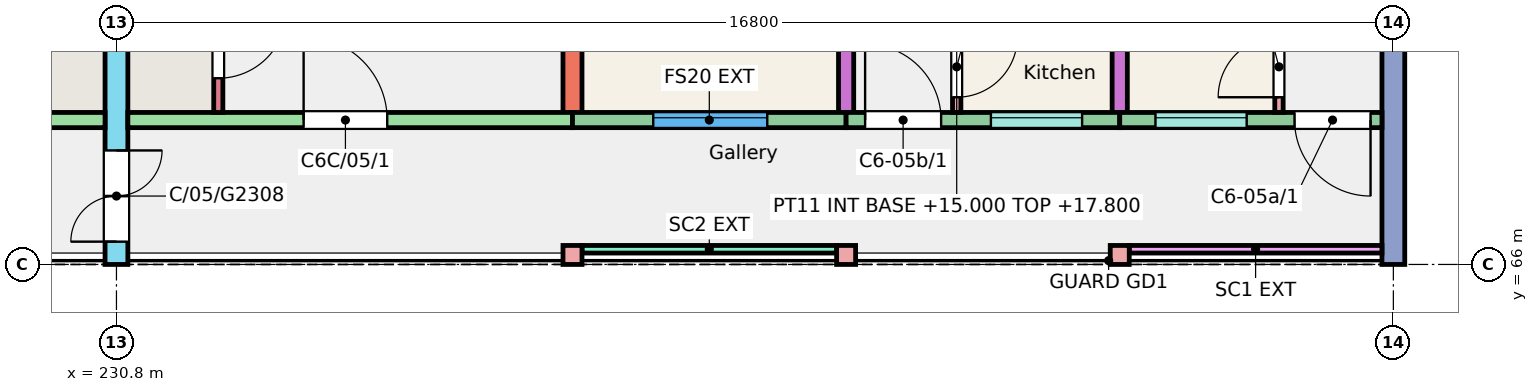
"""IFC4 building model, lengths in metres.
Left out: names, types, materials, properties, quantities, classifications, styles, units other than length and angle.
Written with IfcOpenShell. Run it as: python <this file> out.ifc"""

import sys

from ifc_helpers import new_model, si_unit, direction, frame, frame_2d, origin, origin_2d, place, context, subcontext, project, spatial, rectangle, extrude, element, fill, save


model = new_model("IFC4")
c1 = context("Model", 3, precision=1e-05, world=origin(), true_north=direction((0.0, 1.0)))
c2 = subcontext(c1, "Body", "Model", "MODEL_VIEW")
j1 = project(units=[si_unit("LENGTHUNIT", "METRE"), si_unit("PLANEANGLEUNIT", "RADIAN")], contexts=[c1])
p1 = place(None, origin())
s1 = spatial("IfcSite", under=j1, at=p1, CompositionType="ELEMENT")
p2 = place(p1, origin())
s2 = spatial("IfcBuilding", under=s1, at=p2, CompositionType="ELEMENT")
p3 = place(p2, frame((0.0, 0.0, 15.0)))
s3 = spatial("IfcBuildingStorey", under=s2, at=p3, CompositionType="ELEMENT", Elevation=15.0)
p4 = place(p3, frame((230.8, 66.0, 0.0), z_axis=(0.0, 0.0, 1.0), x_axis=(0.0, 1.0, 0.0)))
e1 = element("IfcWall", 1, at=p4, inside=s3, PredefinedType="SHEAR", context=c2, shape_type="SweptSolid", body=[
    extrude(rectangle(XDim=11.0, YDim=0.3, at=frame_2d((5.5, 0.0))), origin(), (0.0, 0.0, 1.0), 3.0),
])
p5 = place(p4, frame((0.3, 0.0, 0.0)))
e2 = element("IfcOpeningElement", 2, at=p5, cuts=e1, PredefinedType="OPENING", context=c2, shape_type="SweptSolid", body=[
    extrude(rectangle(XDim=1.2, YDim=2.1, at=frame_2d((0.6, 1.05))), frame((0.0, 0.16, 0.0), z_axis=(0.0, -1.0, 0.0), x_axis=(1.0, 0.0, 0.0)), (0.0, 0.0, 1.0), 0.32),
])
p6 = place(p3, frame((236.8, 68.0, 0.0), z_axis=(0.0, 0.0, 1.0), x_axis=(0.0, 1.0, 0.0)))
e3 = element("IfcWall", 3, at=p6, inside=s3, PredefinedType="SHEAR", context=c2, shape_type="SweptSolid", body=[
    extrude(rectangle(XDim=9.0, YDim=0.25, at=frame_2d((4.5, 0.0))), origin(), (0.0, 0.0, 1.0), 3.0),
])
p7 = place(p3, frame((240.4, 68.0, 0.0), z_axis=(0.0, 0.0, 1.0), x_axis=(0.0, 1.0, 0.0)))
e4 = element("IfcWall", 4, at=p7, inside=s3, PredefinedType="SHEAR", context=c2, shape_type="SweptSolid", body=[
    extrude(rectangle(XDim=9.0, YDim=0.2, at=frame_2d((4.5, 0.0))), origin(), (0.0, 0.0, 1.0), 3.0),
])
p8 = place(p7, frame((2.4, 0.0, 0.0)))
e5 = element("IfcOpeningElement", 5, at=p8, cuts=e4, PredefinedType="OPENING", context=c2, shape_type="SweptSolid", body=[
    extrude(rectangle(XDim=1.2, YDim=2.1, at=frame_2d((0.6, 1.05))), frame((0.0, 0.11, 0.0), z_axis=(0.0, -1.0, 0.0), x_axis=(1.0, 0.0, 0.0)), (0.0, 0.0, 1.0), 0.22),
])
p9 = place(p7, frame((6.4, 0.0, 0.0)))
e6 = element("IfcOpeningElement", 6, at=p9, cuts=e4, PredefinedType="OPENING", context=c2, shape_type="SweptSolid", body=[
    extrude(rectangle(XDim=1.2, YDim=2.1, at=frame_2d((0.6, 1.05))), frame((0.0, 0.11, 0.0), z_axis=(0.0, -1.0, 0.0), x_axis=(1.0, 0.0, 0.0)), (0.0, 0.0, 1.0), 0.22),
])
p10 = place(p3, frame((244.0, 68.0, 0.0), z_axis=(0.0, 0.0, 1.0), x_axis=(0.0, 1.0, 0.0)))
e7 = element("IfcWall", 7, at=p10, inside=s3, PredefinedType="SHEAR", context=c2, shape_type="SweptSolid", body=[
    extrude(rectangle(XDim=9.0, YDim=0.2, at=frame_2d((4.5, 0.0))), origin(), (0.0, 0.0, 1.0), 3.0),
])
p11 = place(p3, frame((247.6, 66.0, 0.0), z_axis=(0.0, 0.0, 1.0), x_axis=(0.0, 1.0, 0.0)))
e8 = element("IfcWall", 8, at=p11, inside=s3, PredefinedType="SHEAR", context=c2, shape_type="SweptSolid", body=[
    extrude(rectangle(XDim=11.0, YDim=0.3, at=frame_2d((5.5, 0.0))), origin(), (0.0, 0.0, 1.0), 3.0),
])
p12 = place(p11, frame((8.005, 0.0, 0.9)))
e9 = element("IfcOpeningElement", 9, at=p12, cuts=e8, PredefinedType="OPENING", context=c2, shape_type="SweptSolid", body=[
    extrude(rectangle(XDim=1.8, YDim=1.5, at=frame_2d((0.9, 0.75))), frame((0.0, 0.16, 0.0), z_axis=(0.0, -1.0, 0.0), x_axis=(1.0, 0.0, 0.0)), (0.0, 0.0, 1.0), 0.32),
])
p13 = place(p3, frame((224.8, 67.9, 0.0), z_axis=(0.0, 0.0, 1.0), x_axis=(1.0, 0.0, 0.0)))
e10 = element("IfcWall", 10, at=p13, inside=s3, PredefinedType="SHEAR", context=c2, shape_type="SweptSolid", body=[
    extrude(rectangle(XDim=5.85, YDim=0.2, at=frame_2d((2.925, 0.0))), origin(), (0.0, 0.0, 1.0), 3.0),
])
p14 = place(p13, frame((2.438, 0.0, 0.0)))
e11 = element("IfcOpeningElement", 11, at=p14, cuts=e10, PredefinedType="OPENING", context=c2, shape_type="SweptSolid", body=[
    extrude(rectangle(XDim=1.1, YDim=2.1, at=frame_2d((0.55, 1.05))), frame((0.0, 0.11, 0.0), z_axis=(0.0, -1.0, 0.0), x_axis=(1.0, 0.0, 0.0)), (0.0, 0.0, 1.0), 0.22),
])
p15 = place(p3, frame((230.95, 67.9, 0.0), z_axis=(0.0, 0.0, 1.0), x_axis=(1.0, 0.0, 0.0)))
e12 = element("IfcWall", 12, at=p15, inside=s3, PredefinedType="SHEAR", context=c2, shape_type="SweptSolid", body=[
    extrude(rectangle(XDim=5.85, YDim=0.2, at=frame_2d((2.925, 0.0))), origin(), (0.0, 0.0, 1.0), 3.0),
])
p16 = place(p15, frame((2.312, 0.0, 0.0)))
e13 = element("IfcOpeningElement", 13, at=p16, cuts=e12, PredefinedType="OPENING", context=c2, shape_type="SweptSolid", body=[
    extrude(rectangle(XDim=1.1, YDim=2.1, at=frame_2d((0.55, 1.05))), frame((0.0, 0.11, 0.0), z_axis=(0.0, -1.0, 0.0), x_axis=(1.0, 0.0, 0.0)), (0.0, 0.0, 1.0), 0.22),
])
p17 = place(p3, frame((232.14, 68.0, 0.0), z_axis=(0.0, 0.0, 1.0), x_axis=(0.0, 1.0, 0.0)))
e14 = element("IfcWall", 14, at=p17, inside=s3, PredefinedType="SHEAR", context=c2, shape_type="SweptSolid", body=[
    extrude(rectangle(XDim=1.72, YDim=0.12, at=frame_2d((0.86, 0.0))), origin(), (0.0, 0.0, 1.0), 3.0),
])
p18 = place(p17, frame((0.45, 0.0, 0.0)))
e15 = element("IfcOpeningElement", 15, at=p18, cuts=e14, PredefinedType="OPENING", context=c2, shape_type="SweptSolid", body=[
    extrude(rectangle(XDim=0.9, YDim=2.1, at=frame_2d((0.45, 1.05))), frame((0.0, 0.07, 0.0), z_axis=(0.0, -1.0, 0.0), x_axis=(1.0, 0.0, 0.0)), (0.0, 0.0, 1.0), 0.14),
])
p19 = place(p3, frame((236.8, 67.9, 0.0), z_axis=(0.0, 0.0, 1.0), x_axis=(1.0, 0.0, 0.0)))
e16 = element("IfcWall", 16, at=p19, inside=s3, PredefinedType="SOLIDWALL", context=c2, shape_type="SweptSolid", body=[
    extrude(rectangle(XDim=3.6, YDim=0.2, at=frame_2d((1.8, 0.0))), origin(), (0.0, 0.0, 1.0), 3.0),
])
p20 = place(p19, frame((1.062, 0.0, 0.9)))
e17 = element("IfcOpeningElement", 17, at=p20, cuts=e16, PredefinedType="OPENING", context=c2, shape_type="SweptSolid", body=[
    extrude(rectangle(XDim=1.5, YDim=1.5, at=frame_2d((0.75, 0.75))), frame((0.0, 0.11, 0.0), z_axis=(0.0, -1.0, 0.0), x_axis=(1.0, 0.0, 0.0)), (0.0, 0.0, 1.0), 0.22),
])
p21 = place(p3, frame((240.4, 67.9, 0.0), z_axis=(0.0, 0.0, 1.0), x_axis=(1.0, 0.0, 0.0)))
e18 = element("IfcWall", 18, at=p21, inside=s3, PredefinedType="SOLIDWALL", context=c2, shape_type="SweptSolid", body=[
    extrude(rectangle(XDim=3.6, YDim=0.2, at=frame_2d((1.8, 0.0))), origin(), (0.0, 0.0, 1.0), 3.0),
])
p22 = place(p21, frame((1.905, 0.0, 1.1)))
e19 = element("IfcOpeningElement", 19, at=p22, cuts=e18, PredefinedType="OPENING", context=c2, shape_type="SweptSolid", body=[
    extrude(rectangle(XDim=1.2, YDim=1.3, at=frame_2d((0.6, 0.65))), frame((0.0, 0.11, 0.0), z_axis=(0.0, -1.0, 0.0), x_axis=(1.0, 0.0, 0.0)), (0.0, 0.0, 1.0), 0.22),
])
p23 = place(p21, frame((0.25, 0.0, 0.0)))
e20 = element("IfcOpeningElement", 20, at=p23, cuts=e18, PredefinedType="OPENING", context=c2, shape_type="SweptSolid", body=[
    extrude(rectangle(XDim=1.0, YDim=2.1, at=frame_2d((0.5, 1.05))), frame((0.0, 0.11, 0.0), z_axis=(0.0, -1.0, 0.0), x_axis=(1.0, 0.0, 0.0)), (0.0, 0.0, 1.0), 0.22),
])
p24 = place(p3, frame((244.0, 67.9, 0.0), z_axis=(0.0, 0.0, 1.0), x_axis=(1.0, 0.0, 0.0)))
e21 = element("IfcWall", 21, at=p24, inside=s3, PredefinedType="SOLIDWALL", context=c2, shape_type="SweptSolid", body=[
    extrude(rectangle(XDim=3.45, YDim=0.2, at=frame_2d((1.725, 0.0))), origin(), (0.0, 0.0, 1.0), 3.0),
])
p25 = place(p24, frame((0.47, 0.0, 1.1)))
e22 = element("IfcOpeningElement", 22, at=p25, cuts=e21, PredefinedType="OPENING", context=c2, shape_type="SweptSolid", body=[
    extrude(rectangle(XDim=1.2, YDim=1.3, at=frame_2d((0.6, 0.65))), frame((0.0, 0.11, 0.0), z_axis=(0.0, -1.0, 0.0), x_axis=(1.0, 0.0, 0.0)), (0.0, 0.0, 1.0), 0.22),
])
p26 = place(p24, frame((2.3, 0.0, 0.0)))
e23 = element("IfcOpeningElement", 23, at=p26, cuts=e21, PredefinedType="OPENING", context=c2, shape_type="SweptSolid", body=[
    extrude(rectangle(XDim=1.0, YDim=2.1, at=frame_2d((0.5, 1.05))), frame((0.0, 0.11, 0.0), z_axis=(0.0, -1.0, 0.0), x_axis=(1.0, 0.0, 0.0)), (0.0, 0.0, 1.0), 0.22),
])
for number, where, z_axis, x_axis in (
    (24, (236.8, 66.125, 0.0), (0.0, 0.0, 1.0), (1.0, 0.0, 0.0)),
    (25, (240.4, 66.125, 0.0), (0.0, 0.0, 1.0), (1.0, 0.0, 0.0)),
    (26, (244.0, 66.125, 0.0), (0.0, 0.0, 1.0), (1.0, 0.0, 0.0)),
):
    element("IfcColumn", number, at=place(p3, frame(where, z_axis=z_axis, x_axis=x_axis)), inside=s3, PredefinedType="COLUMN", context=c2, shape_type="SweptSolid", body=[
        extrude(rectangle(XDim=0.25, YDim=0.25, at=origin_2d()), origin(), (0.0, 0.0, 1.0), 3.0),
    ])
p27 = place(p3, frame((236.925, 66.2, 0.0), z_axis=(0.0, 0.0, 1.0), x_axis=(1.0, 0.0, 0.0)))
e27 = element("IfcWall", 27, at=p27, inside=s3, PredefinedType="SOLIDWALL", context=c2, shape_type="SweptSolid", body=[
    extrude(rectangle(XDim=3.35, YDim=0.1, at=frame_2d((1.675, 0.0))), origin(), (0.0, 0.0, 1.0), 2.45),
])
p28 = place(p3, frame((244.125, 66.2, 0.0), z_axis=(0.0, 0.0, 1.0), x_axis=(1.0, 0.0, 0.0)))
e28 = element("IfcWall", 28, at=p28, inside=s3, PredefinedType="SOLIDWALL", context=c2, shape_type="SweptSolid", body=[
    extrude(rectangle(XDim=3.325, YDim=0.1, at=frame_2d((1.663, 0.0))), origin(), (0.0, 0.0, 1.0), 2.45),
])
p29 = place(p3, frame((246.095, 68.0, 0.0), z_axis=(0.0, 0.0, 1.0), x_axis=(0.0, 1.0, 0.0)))
e29 = element("IfcWall", 29, at=p29, inside=s3, PredefinedType="PARTITIONING", context=c2, shape_type="SweptSolid", body=[
    extrude(rectangle(XDim=4.7, YDim=0.11, at=frame_2d((2.35, 0.0))), origin(), (0.0, 0.0, 1.0), 2.8),
])
p30 = place(p29, frame((0.2, 0.0, 0.0)))
e30 = element("IfcOpeningElement", 30, at=p30, cuts=e29, PredefinedType="OPENING", context=c2, shape_type="SweptSolid", body=[
    extrude(rectangle(XDim=0.8, YDim=2.1, at=frame_2d((0.4, 1.05))), frame((0.0, 0.065, 0.0), z_axis=(0.0, -1.0, 0.0), x_axis=(1.0, 0.0, 0.0)), (0.0, 0.0, 1.0), 0.13),
])
p31 = place(p29, frame((3.75, 0.0, 0.0)))
e31 = element("IfcOpeningElement", 31, at=p31, cuts=e29, PredefinedType="OPENING", context=c2, shape_type="SweptSolid", body=[
    extrude(rectangle(XDim=0.8, YDim=2.1, at=frame_2d((0.4, 1.05))), frame((0.0, 0.065, 0.0), z_axis=(0.0, -1.0, 0.0), x_axis=(1.0, 0.0, 0.0)), (0.0, 0.0, 1.0), 0.13),
])
p32 = place(p3, frame((241.855, 68.0, 0.0), z_axis=(0.0, 0.0, 1.0), x_axis=(0.0, 1.0, 0.0)))
e32 = element("IfcWall", 32, at=p32, inside=s3, PredefinedType="PARTITIONING", context=c2, shape_type="SweptSolid", body=[
    extrude(rectangle(XDim=4.5, YDim=0.11, at=frame_2d((2.25, 0.0))), origin(), (0.0, 0.0, 1.0), 2.8),
])
p33 = place(p32, frame((0.2, 0.0, 0.0)))
e33 = element("IfcOpeningElement", 33, at=p33, cuts=e32, PredefinedType="OPENING", context=c2, shape_type="SweptSolid", body=[
    extrude(rectangle(XDim=0.8, YDim=2.1, at=frame_2d((0.4, 1.05))), frame((0.0, 0.065, 0.0), z_axis=(0.0, -1.0, 0.0), x_axis=(1.0, 0.0, 0.0)), (0.0, 0.0, 1.0), 0.13),
])
p34 = place(p32, frame((3.55, 0.0, 0.0)))
e34 = element("IfcOpeningElement", 34, at=p34, cuts=e32, PredefinedType="OPENING", context=c2, shape_type="SweptSolid", body=[
    extrude(rectangle(XDim=0.8, YDim=2.1, at=frame_2d((0.4, 1.05))), frame((0.0, 0.065, 0.0), z_axis=(0.0, -1.0, 0.0), x_axis=(1.0, 0.0, 0.0)), (0.0, 0.0, 1.0), 0.13),
])
p35 = place(p25, origin())
e35 = element("IfcWindow", 35, at=p35, inside=s3, PartitioningType="SINGLE_PANEL", PredefinedType="WINDOW", context=c2, shape_type="SweptSolid", body=[
    extrude(rectangle(XDim=1.2, YDim=1.3, at=frame_2d((0.6, 0.65))), frame((0.0, 0.06, 0.0), z_axis=(0.0, -1.0, 0.0), x_axis=(1.0, 0.0, 0.0)), (0.0, 0.0, 1.0), 0.06),
])
fill(e22, e35)
p36 = place(p20, origin())
e36 = element("IfcWindow", 36, at=p36, inside=s3, PartitioningType="SINGLE_PANEL", PredefinedType="WINDOW", context=c2, shape_type="SweptSolid", body=[
    extrude(rectangle(XDim=1.5, YDim=1.5, at=frame_2d((0.75, 0.75))), frame((0.0, 0.06, 0.0), z_axis=(0.0, -1.0, 0.0), x_axis=(1.0, 0.0, 0.0)), (0.0, 0.0, 1.0), 0.06),
])
fill(e17, e36)
p37 = place(p22, origin())
e37 = element("IfcWindow", 37, at=p37, inside=s3, PartitioningType="SINGLE_PANEL", PredefinedType="WINDOW", context=c2, shape_type="SweptSolid", body=[
    extrude(rectangle(XDim=1.2, YDim=1.3, at=frame_2d((0.6, 0.65))), frame((0.0, 0.06, 0.0), z_axis=(0.0, -1.0, 0.0), x_axis=(1.0, 0.0, 0.0)), (0.0, 0.0, 1.0), 0.06),
])
fill(e19, e37)
p38 = place(p26, origin())
e38 = element("IfcDoor", 38, at=p38, inside=s3, OperationType="SINGLE_SWING_RIGHT", PredefinedType="DOOR", context=c2, shape_type="SweptSolid", body=[
    extrude(rectangle(XDim=1.0, YDim=2.1, at=frame_2d((0.5, 1.05))), frame((0.0, 0.025, 0.0), z_axis=(0.0, -1.0, 0.0), x_axis=(1.0, 0.0, 0.0)), (0.0, 0.0, 1.0), 0.05),
])
fill(e23, e38)
p39 = place(p30, origin())
e39 = element("IfcDoor", 39, at=p39, inside=s3, OperationType="SINGLE_SWING_LEFT", PredefinedType="DOOR", context=c2, shape_type="SweptSolid", body=[
    extrude(rectangle(XDim=0.8, YDim=2.1, at=frame_2d((0.4, 1.05))), frame((0.0, 0.025, 0.0), z_axis=(0.0, -1.0, 0.0), x_axis=(1.0, 0.0, 0.0)), (0.0, 0.0, 1.0), 0.05),
])
fill(e30, e39)
p40 = place(p23, origin())
e40 = element("IfcDoor", 40, at=p40, inside=s3, OperationType="SINGLE_SWING_LEFT", PredefinedType="DOOR", context=c2, shape_type="SweptSolid", body=[
    extrude(rectangle(XDim=1.0, YDim=2.1, at=frame_2d((0.5, 1.05))), frame((0.0, 0.025, 0.0), z_axis=(0.0, -1.0, 0.0), x_axis=(1.0, 0.0, 0.0)), (0.0, 0.0, 1.0), 0.05),
])
fill(e20, e40)
p41 = place(p33, origin())
e41 = element("IfcDoor", 41, at=p41, inside=s3, OperationType="SINGLE_SWING_RIGHT", PredefinedType="DOOR", context=c2, shape_type="SweptSolid", body=[
    extrude(rectangle(XDim=0.8, YDim=2.1, at=frame_2d((0.4, 1.05))), frame((0.0, 0.025, 0.0), z_axis=(0.0, -1.0, 0.0), x_axis=(1.0, 0.0, 0.0)), (0.0, 0.0, 1.0), 0.05),
])
fill(e33, e41)
p42 = place(p16, origin())
e42 = element("IfcDoor", 42, at=p42, inside=s3, OperationType="SINGLE_SWING_LEFT", PredefinedType="DOOR", context=c2, shape_type="SweptSolid", body=[
    extrude(rectangle(XDim=1.1, YDim=2.1, at=frame_2d((0.55, 1.05))), frame((0.0, 0.025, 0.0), z_axis=(0.0, -1.0, 0.0), x_axis=(1.0, 0.0, 0.0)), (0.0, 0.0, 1.0), 0.05),
])
fill(e13, e42)
p43 = place(p18, origin())
e43 = element("IfcDoor", 43, at=p43, inside=s3, OperationType="SINGLE_SWING_RIGHT", PredefinedType="DOOR", context=c2, shape_type="SweptSolid", body=[
    extrude(rectangle(XDim=0.9, YDim=2.1, at=frame_2d((0.45, 1.05))), frame((0.0, 0.025, 0.0), z_axis=(0.0, -1.0, 0.0), x_axis=(1.0, 0.0, 0.0)), (0.0, 0.0, 1.0), 0.05),
])
fill(e15, e43)
p44 = place(p5, origin())
e44 = element("IfcDoor", 44, at=p44, inside=s3, OperationType="DOUBLE_DOOR_SINGLE_SWING", PredefinedType="DOOR", context=c2, shape_type="SweptSolid", body=[
    extrude(rectangle(XDim=1.2, YDim=2.1, at=frame_2d((0.6, 1.05))), frame((0.0, 0.025, 0.0), z_axis=(0.0, -1.0, 0.0), x_axis=(1.0, 0.0, 0.0)), (0.0, 0.0, 1.0), 0.05),
])
fill(e2, e44)
save(model, sys.argv[1])
